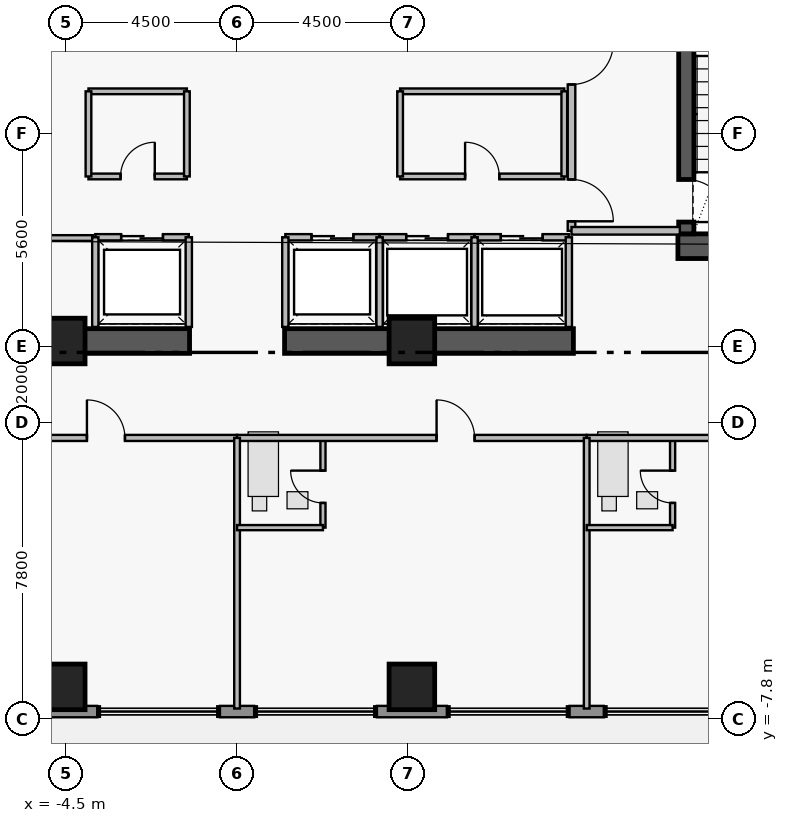
"""IFC4 building model, lengths in metres.
Left out: names, types, materials, properties, quantities, classifications, styles, units other than length and angle.
Written with IfcOpenShell. Run it as: python <this file> out.ifc"""

import sys

from ifc_helpers import new_model, si_unit, direction, frame, frame_2d, origin, origin_2d, place, context, subcontext, project, spatial, rectangle, extrude, element, fill, save


model = new_model("IFC4")
c1 = context("Model", 3, precision=1e-05, world=origin(), true_north=direction((0.0, 1.0)))
c2 = subcontext(c1, "Body", "Model", "MODEL_VIEW")
j1 = project(units=[si_unit("LENGTHUNIT", "METRE"), si_unit("PLANEANGLEUNIT", "RADIAN")], contexts=[c1])
p1 = place(None, origin())
s1 = spatial("IfcSite", under=j1, at=p1, CompositionType="ELEMENT")
p2 = place(p1, origin())
s2 = spatial("IfcBuilding", under=s1, at=p2, CompositionType="ELEMENT")
p3 = place(p2, frame((0.0, 0.0, 226.15)))
s3 = spatial("IfcBuildingStorey", under=s2, at=p3, CompositionType="ELEMENT", Elevation=226.15)
p4 = place(p3, frame((11.6, 4.645, 0.0), z_axis=(0.0, 0.0, 1.0), x_axis=(1.0, 0.0, 0.0)))
e1 = element("IfcWall", 1, at=p4, inside=s3, PredefinedType="SHEAR", context=c2, shape_type="SweptSolid", body=[
    extrude(rectangle(XDim=4.46, YDim=0.65, at=frame_2d((2.23, 0.0))), origin(), (0.0, 0.0, 1.0), 3.56),
])
for number, where, z_axis, x_axis in (
    (2, (-8.85, 2.15, 0.0), (0.0, 0.0, 1.0), (1.0, 0.0, 0.0)),
    (3, (1.25, 2.15, 0.0), (0.0, 0.0, 1.0), (1.0, 0.0, 0.0)),
):
    element("IfcWall", number, at=place(p3, frame(where, z_axis=z_axis, x_axis=x_axis)), inside=s3, PredefinedType="SHEAR", context=c2, shape_type="SweptSolid", body=[
        extrude(rectangle(XDim=7.6, YDim=0.65, at=frame_2d((3.8, 0.0))), origin(), (0.0, 0.0, 1.0), 3.53),
    ])
p5 = place(p3, frame((11.82, 13.93, 0.0), z_axis=(0.0, 0.0, 1.0), x_axis=(0.0, -1.0, 0.0)))
e4 = element("IfcWall", 4, at=p5, inside=s3, PredefinedType="SHEAR", context=c2, shape_type="SweptSolid", body=[
    extrude(rectangle(XDim=8.96, YDim=0.4, at=frame_2d((4.48, 0.0))), origin(), (0.0, 0.0, 1.0), 3.56),
])
p6 = place(p5, frame((7.53, 0.0, 0.0)))
e5 = element("IfcOpeningElement", 5, at=p6, cuts=e4, PredefinedType="OPENING", context=c2, shape_type="SweptSolid", body=[
    extrude(rectangle(XDim=1.12, YDim=2.22, at=frame_2d((0.56, 1.11))), frame((0.0, 0.21, 0.0), z_axis=(0.0, -1.0, 0.0), x_axis=(1.0, 0.0, 0.0)), (0.0, 0.0, 1.0), 0.42),
])
for number, where, z_axis, x_axis in (
    (6, (-4.6, 2.15, 0.0), (0.0, 0.0, 1.0), (1.0, 0.0, 0.0)),
    (7, (4.6, 2.15, 0.0), (0.0, 0.0, 1.0), (1.0, 0.0, 0.0)),
    (8, (-4.6, -6.95, 0.0), (0.0, 0.0, 1.0), (1.0, 0.0, 0.0)),
    (9, (4.6, -6.95, 0.0), (0.0, 0.0, 1.0), (1.0, 0.0, 0.0)),
):
    element("IfcColumn", number, at=place(p3, frame(where, z_axis=z_axis, x_axis=x_axis)), inside=s3, PredefinedType="COLUMN", context=c2, shape_type="SweptSolid", body=[
        extrude(rectangle(XDim=1.2, YDim=1.2, at=origin_2d()), origin(), (0.0, 0.0, 1.0), 3.75),
    ])
p7 = place(p3, frame((9.65, -7.6, 0.0), z_axis=(0.0, 0.0, 1.0), x_axis=(-1.0, 0.0, 0.0)))
e10 = element("IfcWall", 10, at=p7, inside=s3, PredefinedType="STANDARD", context=c2, shape_type="SweptSolid", body=[
    extrude(rectangle(XDim=0.9, YDim=0.3, at=frame_2d((0.45, 0.0))), origin(), (0.0, 0.0, 1.0), 3.53),
])
p8 = place(p3, frame((5.52, -7.6, 0.0), z_axis=(0.0, 0.0, 1.0), x_axis=(-1.0, 0.0, 0.0)))
e11 = element("IfcWall", 11, at=p8, inside=s3, PredefinedType="STANDARD", context=c2, shape_type="SweptSolid", body=[
    extrude(rectangle(XDim=1.84, YDim=0.3, at=frame_2d((0.92, 0.0))), origin(), (0.0, 0.0, 1.0), 3.53),
])
p9 = place(p3, frame((0.45, -7.6, 0.0), z_axis=(0.0, 0.0, 1.0), x_axis=(-1.0, 0.0, 0.0)))
e12 = element("IfcWall", 12, at=p9, inside=s3, PredefinedType="STANDARD", context=c2, shape_type="SweptSolid", body=[
    extrude(rectangle(XDim=0.9, YDim=0.3, at=frame_2d((0.45, 0.0))), origin(), (0.0, 0.0, 1.0), 3.53),
])
p10 = place(p3, frame((-3.68, -7.6, 0.0), z_axis=(0.0, 0.0, 1.0), x_axis=(-1.0, 0.0, 0.0)))
e13 = element("IfcWall", 13, at=p10, inside=s3, PredefinedType="STANDARD", context=c2, shape_type="SweptSolid", body=[
    extrude(rectangle(XDim=1.84, YDim=0.3, at=frame_2d((0.92, 0.0))), origin(), (0.0, 0.0, 1.0), 3.53),
])
p11 = place(p3, frame((8.8, 11.15, 0.0), z_axis=(0.0, 0.0, 1.0), x_axis=(0.0, -1.0, 0.0)))
e14 = element("IfcWall", 14, at=p11, inside=s3, PredefinedType="PARTITIONING", context=c2, shape_type="SweptSolid", body=[
    extrude(rectangle(XDim=6.1, YDim=0.2, at=frame_2d((3.05, 0.0))), origin(), (0.0, 0.0, 1.0), 3.53),
])
p12 = place(p11, frame((1.15, 0.0, 0.0)))
e15 = element("IfcOpeningElement", 15, at=p12, cuts=e14, PredefinedType="OPENING", context=c2, shape_type="SweptSolid", body=[
    extrude(rectangle(XDim=1.1, YDim=2.2, at=frame_2d((0.55, 1.1))), frame((0.0, 0.11, 0.0), z_axis=(0.0, -1.0, 0.0), x_axis=(1.0, 0.0, 0.0)), (0.0, 0.0, 1.0), 0.22),
])
p13 = place(p11, frame((4.75, 0.0, 0.0)))
e16 = element("IfcOpeningElement", 16, at=p13, cuts=e14, PredefinedType="OPENING", context=c2, shape_type="SweptSolid", body=[
    extrude(rectangle(XDim=1.1, YDim=2.2, at=frame_2d((0.55, 1.1))), frame((0.0, 0.11, 0.0), z_axis=(0.0, -1.0, 0.0), x_axis=(1.0, 0.0, 0.0)), (0.0, 0.0, 1.0), 0.22),
])
p14 = place(p3, frame((-3.73, 4.88, 0.0), z_axis=(0.0, 0.0, 1.0), x_axis=(1.0, 0.0, 0.0)))
e17 = element("IfcWall", 17, at=p14, inside=s3, PredefinedType="PARTITIONING", context=c2, shape_type="SweptSolid", body=[
    extrude(rectangle(XDim=2.46, YDim=0.165, at=frame_2d((1.23, 0.0))), origin(), (0.0, 0.0, 1.0), 3.53),
])
p15 = place(p14, frame((0.68, 0.0, 0.0)))
e18 = element("IfcOpeningElement", 18, at=p15, cuts=e17, PredefinedType="OPENING", context=c2, shape_type="SweptSolid", body=[
    extrude(rectangle(XDim=1.1, YDim=2.25, at=frame_2d((0.55, 1.125))), frame((0.0, 0.093, 0.0), z_axis=(0.0, -1.0, 0.0), x_axis=(1.0, 0.0, 0.0)), (0.0, 0.0, 1.0), 0.185),
])
p16 = place(p3, frame((1.27, 4.88, 0.0), z_axis=(0.0, 0.0, 1.0), x_axis=(1.0, 0.0, 0.0)))
e19 = element("IfcWall", 19, at=p16, inside=s3, PredefinedType="PARTITIONING", context=c2, shape_type="SweptSolid", body=[
    extrude(rectangle(XDim=2.48, YDim=0.165, at=frame_2d((1.24, 0.0))), origin(), (0.0, 0.0, 1.0), 3.53),
])
p17 = place(p16, frame((0.69, 0.0, 0.0)))
e20 = element("IfcOpeningElement", 20, at=p17, cuts=e19, PredefinedType="OPENING", context=c2, shape_type="SweptSolid", body=[
    extrude(rectangle(XDim=1.1, YDim=2.25, at=frame_2d((0.55, 1.125))), frame((0.0, 0.093, 0.0), z_axis=(0.0, -1.0, 0.0), x_axis=(1.0, 0.0, 0.0)), (0.0, 0.0, 1.0), 0.185),
])
p18 = place(p3, frame((3.75, 4.88, 0.0), z_axis=(0.0, 0.0, 1.0), x_axis=(1.0, 0.0, 0.0)))
e21 = element("IfcWall", 21, at=p18, inside=s3, PredefinedType="PARTITIONING", context=c2, shape_type="SweptSolid", body=[
    extrude(rectangle(XDim=2.5, YDim=0.165, at=frame_2d((1.25, 0.0))), origin(), (0.0, 0.0, 1.0), 3.53),
])
p19 = place(p18, frame((0.7, 0.0, 0.0)))
e22 = element("IfcOpeningElement", 22, at=p19, cuts=e21, PredefinedType="OPENING", context=c2, shape_type="SweptSolid", body=[
    extrude(rectangle(XDim=1.1, YDim=2.25, at=frame_2d((0.55, 1.125))), frame((0.0, 0.093, 0.0), z_axis=(0.0, -1.0, 0.0), x_axis=(1.0, 0.0, 0.0)), (0.0, 0.0, 1.0), 0.185),
])
p20 = place(p3, frame((6.25, 4.88, 0.0), z_axis=(0.0, 0.0, 1.0), x_axis=(1.0, 0.0, 0.0)))
e23 = element("IfcWall", 23, at=p20, inside=s3, PredefinedType="PARTITIONING", context=c2, shape_type="SweptSolid", body=[
    extrude(rectangle(XDim=2.48, YDim=0.165, at=frame_2d((1.24, 0.0))), origin(), (0.0, 0.0, 1.0), 3.53),
])
p21 = place(p20, frame((0.69, 0.0, 0.0)))
e24 = element("IfcOpeningElement", 24, at=p21, cuts=e23, PredefinedType="OPENING", context=c2, shape_type="SweptSolid", body=[
    extrude(rectangle(XDim=1.1, YDim=2.25, at=frame_2d((0.55, 1.125))), frame((0.0, 0.093, 0.0), z_axis=(0.0, -1.0, 0.0), x_axis=(1.0, 0.0, 0.0)), (0.0, 0.0, 1.0), 0.185),
])
p22 = place(p3, frame((-8.71, 4.86, 0.0), z_axis=(0.0, 0.0, 1.0), x_axis=(1.0, 0.0, 0.0)))
e25 = element("IfcWall", 25, at=p22, inside=s3, PredefinedType="PARTITIONING", context=c2, shape_type="SweptSolid", body=[
    extrude(rectangle(XDim=4.92, YDim=0.15, at=frame_2d((2.46, 0.0))), origin(), (0.0, 0.0, 1.0), 3.53),
])
p23 = place(p22, frame((2.01, 0.0, 0.0)))
e26 = element("IfcOpeningElement", 26, at=p23, cuts=e25, PredefinedType="OPENING", context=c2, shape_type="SweptSolid", body=[
    extrude(rectangle(XDim=0.9, YDim=2.15, at=frame_2d((0.45, 1.075))), frame((0.0, 0.085, 0.0), z_axis=(0.0, -1.0, 0.0), x_axis=(1.0, 0.0, 0.0)), (0.0, 0.0, 1.0), 0.17),
])
p24 = place(p3, frame((-3.91, 6.48, 0.0), z_axis=(0.0, 0.0, 1.0), x_axis=(1.0, 0.0, 0.0)))
e27 = element("IfcWall", 27, at=p24, inside=s3, PredefinedType="PARTITIONING", context=c2, shape_type="SweptSolid", body=[
    extrude(rectangle(XDim=2.59, YDim=0.15, at=frame_2d((1.295, 0.0))), origin(), (0.0, 0.0, 1.0), 3.53),
])
p25 = place(p24, frame((0.845, 0.0, 0.0)))
e28 = element("IfcOpeningElement", 28, at=p25, cuts=e27, PredefinedType="OPENING", context=c2, shape_type="SweptSolid", body=[
    extrude(rectangle(XDim=0.9, YDim=2.15, at=frame_2d((0.45, 1.075))), frame((0.0, 0.085, 0.0), z_axis=(0.0, -1.0, 0.0), x_axis=(1.0, 0.0, 0.0)), (0.0, 0.0, 1.0), 0.17),
])
p26 = place(p3, frame((4.29, 6.48, 0.0), z_axis=(0.0, 0.0, 1.0), x_axis=(1.0, 0.0, 0.0)))
e29 = element("IfcWall", 29, at=p26, inside=s3, PredefinedType="PARTITIONING", context=c2, shape_type="SweptSolid", body=[
    extrude(rectangle(XDim=4.32, YDim=0.15, at=frame_2d((2.16, 0.0))), origin(), (0.0, 0.0, 1.0), 3.53),
])
p27 = place(p26, frame((1.71, 0.0, 0.0)))
e30 = element("IfcOpeningElement", 30, at=p27, cuts=e29, PredefinedType="OPENING", context=c2, shape_type="SweptSolid", body=[
    extrude(rectangle(XDim=0.9, YDim=2.15, at=frame_2d((0.45, 1.075))), frame((0.0, 0.085, 0.0), z_axis=(0.0, -1.0, 0.0), x_axis=(1.0, 0.0, 0.0)), (0.0, 0.0, 1.0), 0.17),
])
p28 = place(p3, frame((-9.2, -0.4, 0.0), z_axis=(0.0, 0.0, 1.0), x_axis=(1.0, 0.0, 0.0)))
e31 = element("IfcWall", 31, at=p28, inside=s3, PredefinedType="PARTITIONING", context=c2, shape_type="SweptSolid", body=[
    extrude(rectangle(XDim=9.2, YDim=0.16, at=frame_2d((4.6, 0.0))), origin(), (0.0, 0.0, 1.0), 3.53),
])
p29 = place(p28, frame((5.25, 0.0, 0.0)))
e32 = element("IfcOpeningElement", 32, at=p29, cuts=e31, PredefinedType="OPENING", context=c2, shape_type="SweptSolid", body=[
    extrude(rectangle(XDim=1.0, YDim=2.15, at=frame_2d((0.5, 1.075))), frame((0.0, 0.09, 0.0), z_axis=(0.0, -1.0, 0.0), x_axis=(1.0, 0.0, 0.0)), (0.0, 0.0, 1.0), 0.18),
])
p30 = place(p3, frame((2.26, -2.76, 0.0), z_axis=(0.0, 0.0, 1.0), x_axis=(0.0, 1.0, 0.0)))
e33 = element("IfcWall", 33, at=p30, inside=s3, PredefinedType="PLUMBINGWALL", context=c2, shape_type="SweptSolid", body=[
    extrude(rectangle(XDim=2.36, YDim=0.135, at=frame_2d((1.18, 0.0))), origin(), (0.0, 0.0, 1.0), 3.53),
])
p31 = place(p30, frame((0.65, 0.0, 0.0)))
e34 = element("IfcOpeningElement", 34, at=p31, cuts=e33, PredefinedType="OPENING", context=c2, shape_type="SweptSolid", body=[
    extrude(rectangle(XDim=0.85, YDim=2.1, at=frame_2d((0.425, 1.05))), frame((0.0, 0.077, 0.0), z_axis=(0.0, -1.0, 0.0), x_axis=(1.0, 0.0, 0.0)), (0.0, 0.0, 1.0), 0.155),
])
p32 = place(p3, frame((0.0, -0.4, 0.0), z_axis=(0.0, 0.0, 1.0), x_axis=(1.0, 0.0, 0.0)))
e35 = element("IfcWall", 35, at=p32, inside=s3, PredefinedType="PARTITIONING", context=c2, shape_type="SweptSolid", body=[
    extrude(rectangle(XDim=9.2, YDim=0.16, at=frame_2d((4.6, 0.0))), origin(), (0.0, 0.0, 1.0), 3.53),
])
p33 = place(p32, frame((5.25, 0.0, 0.0)))
e36 = element("IfcOpeningElement", 36, at=p33, cuts=e35, PredefinedType="OPENING", context=c2, shape_type="SweptSolid", body=[
    extrude(rectangle(XDim=1.0, YDim=2.15, at=frame_2d((0.5, 1.075))), frame((0.0, 0.09, 0.0), z_axis=(0.0, -1.0, 0.0), x_axis=(1.0, 0.0, 0.0)), (0.0, 0.0, 1.0), 0.18),
])
p34 = place(p3, frame((11.46, -2.76, 0.0), z_axis=(0.0, 0.0, 1.0), x_axis=(0.0, 1.0, 0.0)))
e37 = element("IfcWall", 37, at=p34, inside=s3, PredefinedType="PLUMBINGWALL", context=c2, shape_type="SweptSolid", body=[
    extrude(rectangle(XDim=2.36, YDim=0.135, at=frame_2d((1.18, 0.0))), origin(), (0.0, 0.0, 1.0), 3.53),
])
p35 = place(p34, frame((0.65, 0.0, 0.0)))
e38 = element("IfcOpeningElement", 38, at=p35, cuts=e37, PredefinedType="OPENING", context=c2, shape_type="SweptSolid", body=[
    extrude(rectangle(XDim=0.85, YDim=2.1, at=frame_2d((0.425, 1.05))), frame((0.0, 0.077, 0.0), z_axis=(0.0, -1.0, 0.0), x_axis=(1.0, 0.0, 0.0)), (0.0, 0.0, 1.0), 0.155),
])
p36 = place(p3, frame((9.2, -0.4, 0.0), z_axis=(0.0, 0.0, 1.0), x_axis=(1.0, 0.0, 0.0)))
e39 = element("IfcWall", 39, at=p36, inside=s3, PredefinedType="PARTITIONING", context=c2, shape_type="SweptSolid", body=[
    extrude(rectangle(XDim=12.84, YDim=0.16, at=frame_2d((6.42, 0.0))), origin(), (0.0, 0.0, 1.0), 3.53),
])
p37 = place(p36, frame((7.07, 0.0, 0.0)))
e40 = element("IfcOpeningElement", 40, at=p37, cuts=e39, PredefinedType="OPENING", context=c2, shape_type="SweptSolid", body=[
    extrude(rectangle(XDim=1.0, YDim=2.15, at=frame_2d((0.5, 1.075))), frame((0.0, 0.09, 0.0), z_axis=(0.0, -1.0, 0.0), x_axis=(1.0, 0.0, 0.0)), (0.0, 0.0, 1.0), 0.18),
])
p38 = place(p3, frame((8.8, 5.05, 0.0), z_axis=(0.0, 0.0, 1.0), x_axis=(1.0, 0.0, 0.0)))
e41 = element("IfcWall", 41, at=p38, inside=s3, PredefinedType="PARTITIONING", context=c2, shape_type="SweptSolid", body=[
    extrude(rectangle(XDim=2.85, YDim=0.2, at=frame_2d((1.425, 0.0))), origin(), (0.0, 0.0, 1.0), 3.53),
])
for number, where, z_axis, x_axis in (
    (42, (-3.73, 2.52, 0.0), (0.0, 0.0, 1.0), (0.0, 1.0, 0.0)),
    (43, (-1.27, 2.52, 0.0), (0.0, 0.0, 1.0), (0.0, 1.0, 0.0)),
    (44, (1.27, 2.52, 0.0), (0.0, 0.0, 1.0), (0.0, 1.0, 0.0)),
    (45, (3.75, 2.52, 0.0), (0.0, 0.0, 1.0), (0.0, 1.0, 0.0)),
    (46, (6.25, 2.52, 0.0), (0.0, 0.0, 1.0), (0.0, 1.0, 0.0)),
    (47, (8.73, 2.52, 0.0), (0.0, 0.0, 1.0), (0.0, 1.0, 0.0)),
):
    element("IfcWall", number, at=place(p3, frame(where, z_axis=z_axis, x_axis=x_axis)), inside=s3, PredefinedType="PARTITIONING", context=c2, shape_type="SweptSolid", body=[
        extrude(rectangle(XDim=2.36, YDim=0.165, at=frame_2d((1.18, 0.0))), origin(), (0.0, 0.0, 1.0), 3.53),
    ])
p39 = place(p3, frame((-3.91, 8.72, 0.0), z_axis=(0.0, 0.0, 1.0), x_axis=(1.0, 0.0, 0.0)))
e48 = element("IfcWall", 48, at=p39, inside=s3, PredefinedType="PARTITIONING", context=c2, shape_type="SweptSolid", body=[
    extrude(rectangle(XDim=2.59, YDim=0.15, at=frame_2d((1.295, 0.0))), origin(), (0.0, 0.0, 1.0), 3.53),
])
for number, where, z_axis, x_axis in (
    (49, (-3.91, 6.48, 0.0), (0.0, 0.0, 1.0), (0.0, 1.0, 0.0)),
    (50, (-1.32, 6.48, 0.0), (0.0, 0.0, 1.0), (0.0, 1.0, 0.0)),
):
    element("IfcWall", number, at=place(p3, frame(where, z_axis=z_axis, x_axis=x_axis)), inside=s3, PredefinedType="PARTITIONING", context=c2, shape_type="SweptSolid", body=[
        extrude(rectangle(XDim=2.24, YDim=0.15, at=frame_2d((1.12, 0.0))), origin(), (0.0, 0.0, 1.0), 3.53),
    ])
p40 = place(p3, frame((4.29, 8.72, 0.0), z_axis=(0.0, 0.0, 1.0), x_axis=(1.0, 0.0, 0.0)))
e51 = element("IfcWall", 51, at=p40, inside=s3, PredefinedType="PARTITIONING", context=c2, shape_type="SweptSolid", body=[
    extrude(rectangle(XDim=4.32, YDim=0.15, at=frame_2d((2.16, 0.0))), origin(), (0.0, 0.0, 1.0), 3.53),
])
for number, where, z_axis, x_axis in (
    (52, (4.29, 6.48, 0.0), (0.0, 0.0, 1.0), (0.0, 1.0, 0.0)),
    (53, (8.61, 6.48, 0.0), (0.0, 0.0, 1.0), (0.0, 1.0, 0.0)),
):
    element("IfcWall", number, at=place(p3, frame(where, z_axis=z_axis, x_axis=x_axis)), inside=s3, PredefinedType="PARTITIONING", context=c2, shape_type="SweptSolid", body=[
        extrude(rectangle(XDim=2.24, YDim=0.15, at=frame_2d((1.12, 0.0))), origin(), (0.0, 0.0, 1.0), 3.53),
    ])
p41 = place(p3, frame((0.0, -7.52, 0.0), z_axis=(0.0, 0.0, 1.0), x_axis=(0.0, 1.0, 0.0)))
e54 = element("IfcWall", 54, at=p41, inside=s3, PredefinedType="PARTITIONING", context=c2, shape_type="SweptSolid", body=[
    extrude(rectangle(XDim=7.12, YDim=0.15, at=frame_2d((3.56, 0.0))), origin(), (0.0, 0.0, 1.0), 3.53),
])
p42 = place(p3, frame((0.0, -2.76, 0.0), z_axis=(0.0, 0.0, 1.0), x_axis=(1.0, 0.0, 0.0)))
e55 = element("IfcWall", 55, at=p42, inside=s3, PredefinedType="PLUMBINGWALL", context=c2, shape_type="SweptSolid", body=[
    extrude(rectangle(XDim=2.26, YDim=0.135, at=frame_2d((1.13, 0.0))), origin(), (0.0, 0.0, 1.0), 3.124),
])
p43 = place(p3, frame((9.2, -7.52, 0.0), z_axis=(0.0, 0.0, 1.0), x_axis=(0.0, 1.0, 0.0)))
e56 = element("IfcWall", 56, at=p43, inside=s3, PredefinedType="PARTITIONING", context=c2, shape_type="SweptSolid", body=[
    extrude(rectangle(XDim=7.12, YDim=0.15, at=frame_2d((3.56, 0.0))), origin(), (0.0, 0.0, 1.0), 3.53),
])
p44 = place(p3, frame((9.2, -2.76, 0.0), z_axis=(0.0, 0.0, 1.0), x_axis=(1.0, 0.0, 0.0)))
e57 = element("IfcWall", 57, at=p44, inside=s3, PredefinedType="PLUMBINGWALL", context=c2, shape_type="SweptSolid", body=[
    extrude(rectangle(XDim=2.26, YDim=0.135, at=frame_2d((1.13, 0.0))), origin(), (0.0, 0.0, 1.0), 3.124),
])
p45 = place(p6, origin())
e58 = element("IfcDoor", 58, at=p45, inside=s3, OperationType="SINGLE_SWING_RIGHT", PredefinedType="DOOR", context=c2, shape_type="SweptSolid", body=[
    extrude(rectangle(XDim=1.12, YDim=2.22, at=frame_2d((0.56, 1.11))), frame((0.0, 0.025, 0.0), z_axis=(0.0, -1.0, 0.0), x_axis=(1.0, 0.0, 0.0)), (0.0, 0.0, 1.0), 0.05),
])
fill(e5, e58)
p46 = place(p12, origin())
e59 = element("IfcDoor", 59, at=p46, inside=s3, OperationType="SINGLE_SWING_LEFT", PredefinedType="DOOR", context=c2, shape_type="SweptSolid", body=[
    extrude(rectangle(XDim=1.1, YDim=2.2, at=frame_2d((0.55, 1.1))), frame((0.0, 0.025, 0.0), z_axis=(0.0, -1.0, 0.0), x_axis=(1.0, 0.0, 0.0)), (0.0, 0.0, 1.0), 0.05),
])
fill(e15, e59)
p47 = place(p13, origin())
e60 = element("IfcDoor", 60, at=p47, inside=s3, OperationType="SINGLE_SWING_RIGHT", PredefinedType="DOOR", context=c2, shape_type="SweptSolid", body=[
    extrude(rectangle(XDim=1.1, YDim=2.2, at=frame_2d((0.55, 1.1))), frame((0.0, 0.025, 0.0), z_axis=(0.0, -1.0, 0.0), x_axis=(1.0, 0.0, 0.0)), (0.0, 0.0, 1.0), 0.05),
])
fill(e16, e60)
p48 = place(p15, origin())
e61 = element("IfcDoor", 61, at=p48, inside=s3, OperationType="SLIDING_TO_LEFT", PredefinedType="DOOR", context=c2, shape_type="SweptSolid", body=[
    extrude(rectangle(XDim=1.1, YDim=2.25, at=frame_2d((0.55, 1.125))), frame((0.0, 0.025, 0.0), z_axis=(0.0, -1.0, 0.0), x_axis=(1.0, 0.0, 0.0)), (0.0, 0.0, 1.0), 0.05),
])
fill(e18, e61)
p49 = place(p17, origin())
e62 = element("IfcDoor", 62, at=p49, inside=s3, OperationType="SLIDING_TO_LEFT", PredefinedType="DOOR", context=c2, shape_type="SweptSolid", body=[
    extrude(rectangle(XDim=1.1, YDim=2.25, at=frame_2d((0.55, 1.125))), frame((0.0, 0.025, 0.0), z_axis=(0.0, -1.0, 0.0), x_axis=(1.0, 0.0, 0.0)), (0.0, 0.0, 1.0), 0.05),
])
fill(e20, e62)
p50 = place(p19, origin())
e63 = element("IfcDoor", 63, at=p50, inside=s3, OperationType="SLIDING_TO_LEFT", PredefinedType="DOOR", context=c2, shape_type="SweptSolid", body=[
    extrude(rectangle(XDim=1.1, YDim=2.25, at=frame_2d((0.55, 1.125))), frame((0.0, 0.025, 0.0), z_axis=(0.0, -1.0, 0.0), x_axis=(1.0, 0.0, 0.0)), (0.0, 0.0, 1.0), 0.05),
])
fill(e22, e63)
p51 = place(p21, origin())
e64 = element("IfcDoor", 64, at=p51, inside=s3, OperationType="SLIDING_TO_LEFT", PredefinedType="DOOR", context=c2, shape_type="SweptSolid", body=[
    extrude(rectangle(XDim=1.1, YDim=2.25, at=frame_2d((0.55, 1.125))), frame((0.0, 0.025, 0.0), z_axis=(0.0, -1.0, 0.0), x_axis=(1.0, 0.0, 0.0)), (0.0, 0.0, 1.0), 0.05),
])
fill(e24, e64)
p52 = place(p25, origin())
e65 = element("IfcDoor", 65, at=p52, inside=s3, OperationType="SINGLE_SWING_RIGHT", PredefinedType="DOOR", context=c2, shape_type="SweptSolid", body=[
    extrude(rectangle(XDim=0.9, YDim=2.15, at=frame_2d((0.45, 1.075))), frame((0.0, 0.025, 0.0), z_axis=(0.0, -1.0, 0.0), x_axis=(1.0, 0.0, 0.0)), (0.0, 0.0, 1.0), 0.05),
])
fill(e28, e65)
p53 = place(p27, origin())
e66 = element("IfcDoor", 66, at=p53, inside=s3, OperationType="SINGLE_SWING_LEFT", PredefinedType="DOOR", context=c2, shape_type="SweptSolid", body=[
    extrude(rectangle(XDim=0.9, YDim=2.15, at=frame_2d((0.45, 1.075))), frame((0.0, 0.025, 0.0), z_axis=(0.0, -1.0, 0.0), x_axis=(1.0, 0.0, 0.0)), (0.0, 0.0, 1.0), 0.05),
])
fill(e30, e66)
p54 = place(p29, origin())
e67 = element("IfcDoor", 67, at=p54, inside=s3, OperationType="SINGLE_SWING_LEFT", PredefinedType="DOOR", context=c2, shape_type="SweptSolid", body=[
    extrude(rectangle(XDim=1.0, YDim=2.15, at=frame_2d((0.5, 1.075))), frame((0.0, 0.025, 0.0), z_axis=(0.0, -1.0, 0.0), x_axis=(1.0, 0.0, 0.0)), (0.0, 0.0, 1.0), 0.05),
])
fill(e32, e67)
p55 = place(p31, origin())
e68 = element("IfcDoor", 68, at=p55, inside=s3, OperationType="SINGLE_SWING_RIGHT", PredefinedType="DOOR", context=c2, shape_type="SweptSolid", body=[
    extrude(rectangle(XDim=0.85, YDim=2.1, at=frame_2d((0.425, 1.05))), frame((0.0, 0.025, 0.0), z_axis=(0.0, -1.0, 0.0), x_axis=(1.0, 0.0, 0.0)), (0.0, 0.0, 1.0), 0.05),
])
fill(e34, e68)
p56 = place(p33, origin())
e69 = element("IfcDoor", 69, at=p56, inside=s3, OperationType="SINGLE_SWING_LEFT", PredefinedType="DOOR", context=c2, shape_type="SweptSolid", body=[
    extrude(rectangle(XDim=1.0, YDim=2.15, at=frame_2d((0.5, 1.075))), frame((0.0, 0.025, 0.0), z_axis=(0.0, -1.0, 0.0), x_axis=(1.0, 0.0, 0.0)), (0.0, 0.0, 1.0), 0.05),
])
fill(e36, e69)
p57 = place(p35, origin())
e70 = element("IfcDoor", 70, at=p57, inside=s3, OperationType="SINGLE_SWING_RIGHT", PredefinedType="DOOR", context=c2, shape_type="SweptSolid", body=[
    extrude(rectangle(XDim=0.85, YDim=2.1, at=frame_2d((0.425, 1.05))), frame((0.0, 0.025, 0.0), z_axis=(0.0, -1.0, 0.0), x_axis=(1.0, 0.0, 0.0)), (0.0, 0.0, 1.0), 0.05),
])
fill(e38, e70)
save(model, sys.argv[1])
